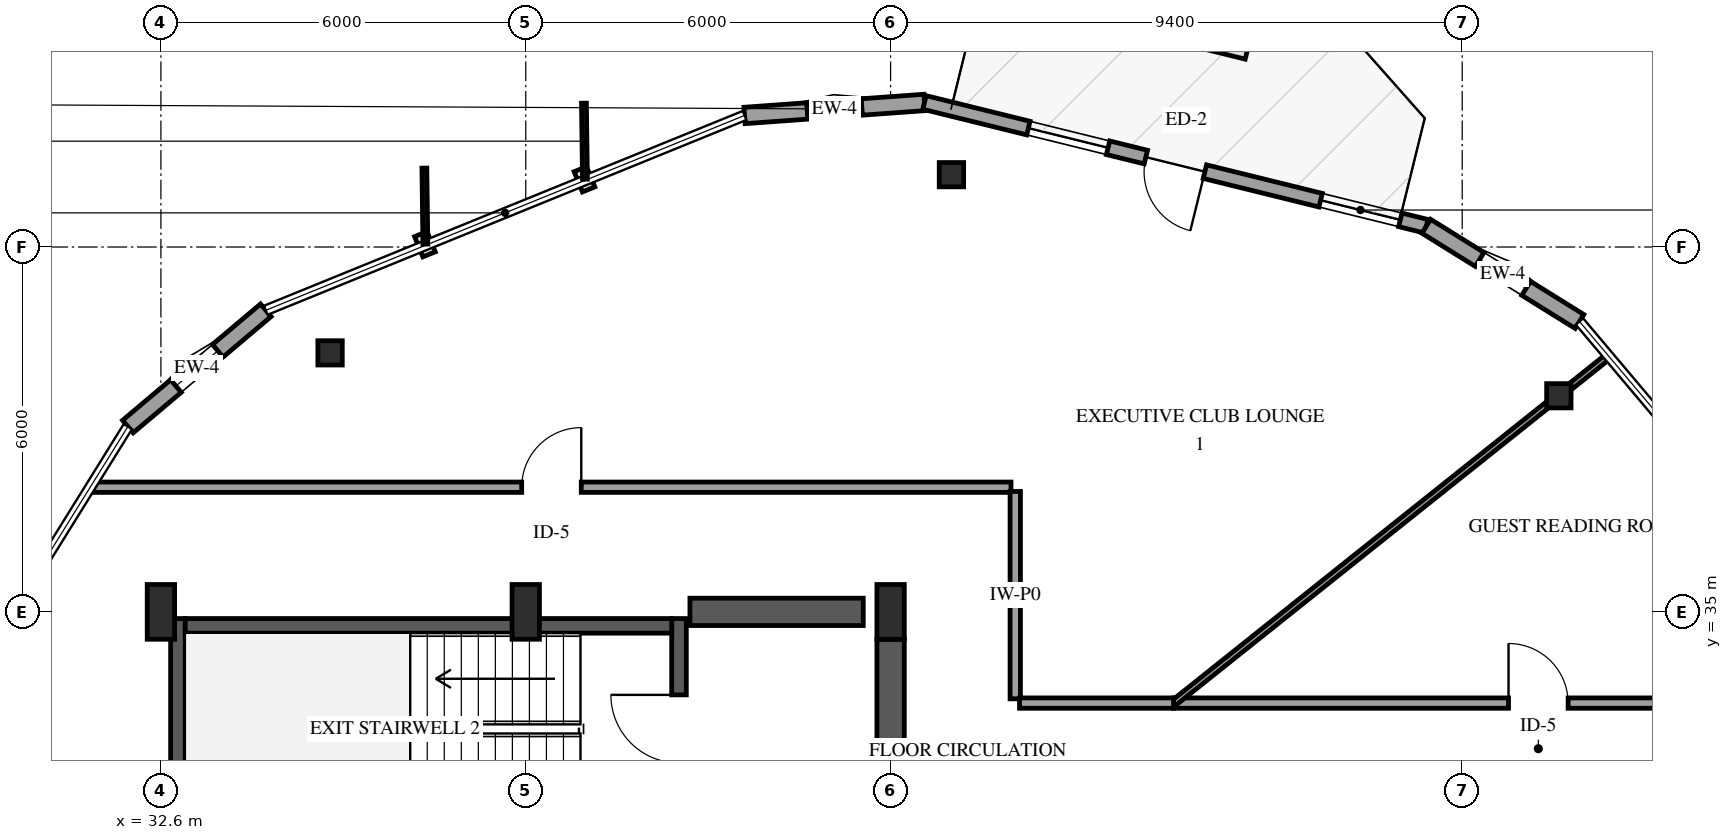
"""IFC4 building model, lengths in metres.
Left out: names, types, materials, properties, quantities, classifications, styles, units other than length and angle.
Written with IfcOpenShell. Run it as: python <this file> out.ifc"""

import sys

from ifc_helpers import new_model, si_unit, direction, frame, frame_2d, origin, origin_2d, place, context, subcontext, project, spatial, rectangle, i_section, extrude, element, fill, save


model = new_model("IFC4")
c1 = context("Model", 3, precision=1e-05, world=origin(), true_north=direction((0.0, 1.0)))
c2 = subcontext(c1, "Body", "Model", "MODEL_VIEW")
j1 = project(units=[si_unit("LENGTHUNIT", "METRE"), si_unit("PLANEANGLEUNIT", "RADIAN")], contexts=[c1])
p1 = place(None, origin())
s1 = spatial("IfcSite", under=j1, at=p1, CompositionType="ELEMENT")
p2 = place(p1, origin())
s2 = spatial("IfcBuilding", under=s1, at=p2, CompositionType="ELEMENT")
p3 = place(p2, frame((0.0, 0.0, 246.25)))
s3 = spatial("IfcBuildingStorey", under=s2, at=p3, CompositionType="ELEMENT", Elevation=246.25)
p4 = place(p3, frame((32.88, 31.26, 0.0), z_axis=(0.0, 0.0, 1.0), x_axis=(0.0, 1.0, 0.0)))
e1 = element("IfcWall", 1, at=p4, inside=s3, PredefinedType="SHEAR", context=c2, shape_type="SweptSolid", body=[
    extrude(rectangle(XDim=3.63, YDim=0.24, at=frame_2d((1.815, 0.0))), origin(), (0.0, 0.0, 1.0), 3.75),
])
p5 = place(p3, frame((41.12, 31.26, 0.0), z_axis=(0.0, 0.0, 1.0), x_axis=(0.0, 1.0, 0.0)))
e2 = element("IfcWall", 2, at=p5, inside=s3, PredefinedType="SHEAR", context=c2, shape_type="SweptSolid", body=[
    extrude(rectangle(XDim=3.63, YDim=0.24, at=frame_2d((1.815, 0.0))), origin(), (0.0, 0.0, 1.0), 3.75),
])
p6 = place(p5, frame((1.255, 0.0, 0.0)))
e3 = element("IfcOpeningElement", 3, at=p6, cuts=e2, PredefinedType="OPENING", context=c2, shape_type="SweptSolid", body=[
    extrude(rectangle(XDim=1.12, YDim=2.15, at=frame_2d((0.56, 1.075))), frame((0.0, 0.13, 0.0), z_axis=(0.0, -1.0, 0.0), x_axis=(1.0, 0.0, 0.0)), (0.0, 0.0, 1.0), 0.26),
])
p7 = place(p3, frame((33.0, 34.77, 0.0), z_axis=(0.0, 0.0, 1.0), x_axis=(1.0, 0.0, 0.0)))
e4 = element("IfcWall", 4, at=p7, inside=s3, PredefinedType="SHEAR", context=c2, shape_type="SweptSolid", body=[
    extrude(rectangle(XDim=8.0, YDim=0.24, at=frame_2d((4.0, 0.0))), origin(), (0.0, 0.0, 1.0), 3.75),
])
p8 = place(p3, frame((41.3, 35.0, 0.0), z_axis=(0.0, 0.0, 1.0), x_axis=(1.0, 0.0, 0.0)))
e5 = element("IfcWall", 5, at=p8, inside=s3, PredefinedType="SHEAR", context=c2, shape_type="SweptSolid", body=[
    extrude(rectangle(XDim=2.85, YDim=0.45, at=frame_2d((1.425, 0.0))), origin(), (0.0, 0.0, 1.0), 3.75),
])
p9 = place(p3, frame((44.6, 29.8, 0.0), z_axis=(0.0, 0.0, 1.0), x_axis=(0.0, 1.0, 0.0)))
e6 = element("IfcWall", 6, at=p9, inside=s3, PredefinedType="SHEAR", context=c2, shape_type="SweptSolid", body=[
    extrude(rectangle(XDim=4.75, YDim=0.45, at=frame_2d((2.375, 0.0))), origin(), (0.0, 0.0, 1.0), 3.75),
])
for number, where, z_axis, x_axis in (
    (7, (32.6, 35.0, 0.0), (0.0, 0.0, 1.0), (1.0, 0.0, 0.0)),
    (8, (38.6, 35.0, 0.0), (0.0, 0.0, 1.0), (1.0, 0.0, 0.0)),
    (9, (44.6, 35.0, 0.0), (0.0, 0.0, 1.0), (1.0, 0.0, 0.0)),
):
    element("IfcColumn", number, at=place(p3, frame(where, z_axis=z_axis, x_axis=x_axis)), inside=s3, PredefinedType="PILASTER", context=c2, shape_type="SweptSolid", body=[
        extrude(rectangle(XDim=0.45, YDim=0.9, at=origin_2d()), origin(), (0.0, 0.0, 1.0), 3.75),
    ])
for number, where, z_axis, x_axis in (
    (10, (55.589, 38.554, 0.0), (0.0, 0.0, 1.0), (1.0, 0.0, 0.0)),
    (11, (45.6, 42.189, 0.0), (0.0, 0.0, 1.0), (1.0, 0.0, 0.0)),
    (12, (35.382, 39.26, 0.0), (0.0, 0.0, 1.0), (1.0, 0.0, 0.0)),
):
    element("IfcColumn", number, at=place(p3, frame(where, z_axis=z_axis, x_axis=x_axis)), inside=s3, PredefinedType="COLUMN", context=c2, shape_type="SweptSolid", body=[
        extrude(i_section(OverallWidth=0.401, OverallDepth=0.399, WebThickness=0.025, FlangeThickness=0.04, FilletRadius=0.038, at=origin_2d()), origin(), (0.0, 0.0, 1.0), 3.75),
    ])
p10 = place(p3, frame((45.157, 43.377, 0.0), z_axis=(0.0, 0.0, 1.0), x_axis=(-0.997392270269, -0.072171041339, 0.0)))
e13 = element("IfcWall", 13, at=p10, inside=s3, PredefinedType="SOLIDWALL", context=c2, shape_type="SweptSolid", body=[
    extrude(rectangle(XDim=2.967, YDim=0.27, at=frame_2d((1.483, 0.0))), origin(), (0.0, 0.0, 1.0), 2.829),
])
p11 = place(p10, frame((1.033, 0.0, 0.75)))
e14 = element("IfcOpeningElement", 14, at=p11, cuts=e13, PredefinedType="OPENING", context=c2, shape_type="SweptSolid", body=[
    extrude(rectangle(XDim=0.9, YDim=1.5, at=frame_2d((0.45, 0.75))), frame((0.0, 0.145, 0.0), z_axis=(0.0, -1.0, 0.0), x_axis=(1.0, 0.0, 0.0)), (0.0, 0.0, 1.0), 0.29),
])
p12 = place(p3, frame((53.409, 41.341, 0.0), z_axis=(0.0, 0.0, 1.0), x_axis=(-0.970889723336, 0.239526919408, 0.0)))
e15 = element("IfcWall", 15, at=p12, inside=s3, PredefinedType="SOLIDWALL", context=c2, shape_type="SweptSolid", body=[
    extrude(rectangle(XDim=8.5, YDim=0.23, at=frame_2d((4.25, 0.0))), origin(), (0.0, 0.0, 1.0), 2.829),
])
p13 = place(p12, frame((3.75, 0.0, 0.0)))
e16 = element("IfcOpeningElement", 16, at=p13, cuts=e15, PredefinedType="OPENING", context=c2, shape_type="SweptSolid", body=[
    extrude(rectangle(XDim=1.0, YDim=2.15, at=frame_2d((0.5, 1.075))), frame((0.0, 0.125, 0.0), z_axis=(0.0, -1.0, 0.0), x_axis=(1.0, 0.0, 0.0)), (0.0, 0.0, 1.0), 0.25),
])
p14 = place(p12, frame((0.44, 0.0, 0.72)))
e17 = element("IfcOpeningElement", 17, at=p14, cuts=e15, PredefinedType="OPENING", context=c2, shape_type="SweptSolid", body=[
    extrude(rectangle(XDim=1.35, YDim=1.65, at=frame_2d((0.675, 0.825))), frame((0.0, 0.125, 0.0), z_axis=(0.0, -1.0, 0.0), x_axis=(1.0, 0.0, 0.0)), (0.0, 0.0, 1.0), 0.25),
])
p15 = place(p12, frame((5.39, 0.0, 0.72)))
e18 = element("IfcOpeningElement", 18, at=p15, cuts=e15, PredefinedType="OPENING", context=c2, shape_type="SweptSolid", body=[
    extrude(rectangle(XDim=1.35, YDim=1.65, at=frame_2d((0.675, 0.825))), frame((0.0, 0.125, 0.0), z_axis=(0.0, -1.0, 0.0), x_axis=(1.0, 0.0, 0.0)), (0.0, 0.0, 1.0), 0.25),
])
p16 = place(p3, frame((34.325, 39.96, 0.0), z_axis=(0.0, 0.0, 1.0), x_axis=(-0.764511985062, -0.644609513347, 0.0)))
e19 = element("IfcWall", 19, at=p16, inside=s3, PredefinedType="SOLIDWALL", context=c2, shape_type="SweptSolid", body=[
    extrude(rectangle(XDim=2.967, YDim=0.27, at=frame_2d((1.483, 0.0))), origin(), (0.0, 0.0, 1.0), 2.829),
])
p17 = place(p16, frame((1.033, 0.0, 0.75)))
e20 = element("IfcOpeningElement", 20, at=p17, cuts=e19, PredefinedType="OPENING", context=c2, shape_type="SweptSolid", body=[
    extrude(rectangle(XDim=0.9, YDim=1.5, at=frame_2d((0.45, 0.75))), frame((0.0, 0.145, 0.0), z_axis=(0.0, -1.0, 0.0), x_axis=(1.0, 0.0, 0.0)), (0.0, 0.0, 1.0), 0.29),
])
p18 = place(p3, frame((55.929, 39.775, 0.0), z_axis=(0.0, 0.0, 1.0), x_axis=(-0.849350139028, 0.527829841268, 0.0)))
e21 = element("IfcWall", 21, at=p18, inside=s3, PredefinedType="SOLIDWALL", context=c2, shape_type="SweptSolid", body=[
    extrude(rectangle(XDim=2.967, YDim=0.27, at=frame_2d((1.483, 0.0))), origin(), (0.0, 0.0, 1.0), 2.829),
])
p19 = place(p18, frame((1.033, 0.0, 0.75)))
e22 = element("IfcOpeningElement", 22, at=p19, cuts=e21, PredefinedType="OPENING", context=c2, shape_type="SweptSolid", body=[
    extrude(rectangle(XDim=0.9, YDim=1.5, at=frame_2d((0.45, 0.75))), frame((0.0, 0.145, 0.0), z_axis=(0.0, -1.0, 0.0), x_axis=(1.0, 0.0, 0.0)), (0.0, 0.0, 1.0), 0.29),
])
p20 = place(p3, frame((31.437, 37.05, 0.0), z_axis=(0.0, 0.0, 1.0), x_axis=(1.0, 0.0, 0.0)))
e23 = element("IfcWall", 23, at=p20, inside=s3, PredefinedType="PARTITIONING", context=c2, shape_type="SweptSolid", body=[
    extrude(rectangle(XDim=15.143, YDim=0.17, at=frame_2d((7.572, 0.0))), origin(), (0.0, 0.0, 1.0), 3.45),
])
p21 = place(p20, frame((7.096, 0.0, 0.0)))
e24 = element("IfcOpeningElement", 24, at=p21, cuts=e23, PredefinedType="OPENING", context=c2, shape_type="SweptSolid", body=[
    extrude(rectangle(XDim=0.98, YDim=2.15, at=frame_2d((0.49, 1.075))), frame((0.0, 0.095, 0.0), z_axis=(0.0, -1.0, 0.0), x_axis=(1.0, 0.0, 0.0)), (0.0, 0.0, 1.0), 0.19),
])
p22 = place(p3, frame((49.254, 33.5, 0.0), z_axis=(0.0, 0.0, 1.0), x_axis=(1.0, 0.0, 0.0)))
e25 = element("IfcWall", 25, at=p22, inside=s3, PredefinedType="PARTITIONING", context=c2, shape_type="SweptSolid", body=[
    extrude(rectangle(XDim=11.967, YDim=0.17, at=frame_2d((5.983, 0.0))), origin(), (0.0, 0.0, 1.0), 3.45),
])
p23 = place(p22, frame((5.508, 0.0, 0.0)))
e26 = element("IfcOpeningElement", 26, at=p23, cuts=e25, PredefinedType="OPENING", context=c2, shape_type="SweptSolid", body=[
    extrude(rectangle(XDim=0.98, YDim=2.15, at=frame_2d((0.49, 1.075))), frame((0.0, 0.095, 0.0), z_axis=(0.0, -1.0, 0.0), x_axis=(1.0, 0.0, 0.0)), (0.0, 0.0, 1.0), 0.19),
])
p24 = place(p3, frame((49.254, 33.5, 0.0), z_axis=(0.0, 0.0, 1.0), x_axis=(0.781732154671, 0.623614334628, 0.0)))
e27 = element("IfcWall", 27, at=p24, inside=s3, PredefinedType="PARTITIONING", context=c2, shape_type="SweptSolid", body=[
    extrude(rectangle(XDim=9.152, YDim=0.1, at=frame_2d((4.576, 0.0))), origin(), (0.0, 0.0, 1.0), 3.45),
])
p25 = place(p3, frame((46.65, 36.98, 0.0), z_axis=(0.0, 0.0, 1.0), x_axis=(0.0, -1.0, 0.0)))
e28 = element("IfcWall", 28, at=p25, inside=s3, PredefinedType="PARTITIONING", context=c2, shape_type="SweptSolid", body=[
    extrude(rectangle(XDim=3.41, YDim=0.17, at=frame_2d((1.705, 0.0))), origin(), (0.0, 0.0, 1.0), 3.45),
])
p26 = place(p3, frame((46.72, 33.5, 0.0), z_axis=(0.0, 0.0, 1.0), x_axis=(1.0, 0.0, 0.0)))
e29 = element("IfcWall", 29, at=p26, inside=s3, PredefinedType="PARTITIONING", context=c2, shape_type="SweptSolid", body=[
    extrude(rectangle(XDim=2.534, YDim=0.17, at=frame_2d((1.267, 0.0))), origin(), (0.0, 0.0, 1.0), 3.45),
])
p27 = place(p11, origin())
e30 = element("IfcWindow", 30, at=p27, inside=s3, PartitioningType="SINGLE_PANEL", PredefinedType="WINDOW", context=c2, shape_type="SweptSolid", body=[
    extrude(rectangle(XDim=0.9, YDim=1.5, at=frame_2d((0.45, 0.75))), frame((0.0, 0.03, 0.0), z_axis=(0.0, -1.0, 0.0), x_axis=(1.0, 0.0, 0.0)), (0.0, 0.0, 1.0), 0.06),
])
fill(e14, e30)
p28 = place(p13, origin())
e31 = element("IfcDoor", 31, at=p28, inside=s3, OperationType="SINGLE_SWING_LEFT", PredefinedType="DOOR", context=c2, shape_type="SweptSolid", body=[
    extrude(rectangle(XDim=1.0, YDim=2.15, at=frame_2d((0.5, 1.075))), frame((0.0, 0.025, 0.0), z_axis=(0.0, -1.0, 0.0), x_axis=(1.0, 0.0, 0.0)), (0.0, 0.0, 1.0), 0.05),
])
fill(e16, e31)
p29 = place(p14, origin())
e32 = element("IfcWindow", 32, at=p29, inside=s3, PartitioningType="SINGLE_PANEL", PredefinedType="WINDOW", context=c2, shape_type="SweptSolid", body=[
    extrude(rectangle(XDim=1.35, YDim=1.65, at=frame_2d((0.675, 0.825))), frame((0.0, 0.03, 0.0), z_axis=(0.0, -1.0, 0.0), x_axis=(1.0, 0.0, 0.0)), (0.0, 0.0, 1.0), 0.06),
])
fill(e17, e32)
p30 = place(p15, origin())
e33 = element("IfcWindow", 33, at=p30, inside=s3, PartitioningType="SINGLE_PANEL", PredefinedType="WINDOW", context=c2, shape_type="SweptSolid", body=[
    extrude(rectangle(XDim=1.35, YDim=1.65, at=frame_2d((0.675, 0.825))), frame((0.0, 0.03, 0.0), z_axis=(0.0, -1.0, 0.0), x_axis=(1.0, 0.0, 0.0)), (0.0, 0.0, 1.0), 0.06),
])
fill(e18, e33)
p31 = place(p17, origin())
e34 = element("IfcWindow", 34, at=p31, inside=s3, PartitioningType="SINGLE_PANEL", PredefinedType="WINDOW", context=c2, shape_type="SweptSolid", body=[
    extrude(rectangle(XDim=0.9, YDim=1.5, at=frame_2d((0.45, 0.75))), frame((0.0, 0.03, 0.0), z_axis=(0.0, -1.0, 0.0), x_axis=(1.0, 0.0, 0.0)), (0.0, 0.0, 1.0), 0.06),
])
fill(e20, e34)
p32 = place(p19, origin())
e35 = element("IfcWindow", 35, at=p32, inside=s3, PartitioningType="SINGLE_PANEL", PredefinedType="WINDOW", context=c2, shape_type="SweptSolid", body=[
    extrude(rectangle(XDim=0.9, YDim=1.5, at=frame_2d((0.45, 0.75))), frame((0.0, 0.03, 0.0), z_axis=(0.0, -1.0, 0.0), x_axis=(1.0, 0.0, 0.0)), (0.0, 0.0, 1.0), 0.06),
])
fill(e22, e35)
p33 = place(p6, origin())
e36 = element("IfcDoor", 36, at=p33, inside=s3, OperationType="SINGLE_SWING_RIGHT", PredefinedType="DOOR", context=c2, shape_type="SweptSolid", body=[
    extrude(rectangle(XDim=1.12, YDim=2.15, at=frame_2d((0.56, 1.075))), frame((0.0, 0.025, 0.0), z_axis=(0.0, -1.0, 0.0), x_axis=(1.0, 0.0, 0.0)), (0.0, 0.0, 1.0), 0.05),
])
fill(e3, e36)
p34 = place(p21, origin())
e37 = element("IfcDoor", 37, at=p34, inside=s3, OperationType="SINGLE_SWING_RIGHT", PredefinedType="DOOR", context=c2, shape_type="SweptSolid", body=[
    extrude(rectangle(XDim=0.98, YDim=2.15, at=frame_2d((0.49, 1.075))), frame((0.0, 0.025, 0.0), z_axis=(0.0, -1.0, 0.0), x_axis=(1.0, 0.0, 0.0)), (0.0, 0.0, 1.0), 0.05),
])
fill(e24, e37)
p35 = place(p23, origin())
e38 = element("IfcDoor", 38, at=p35, inside=s3, OperationType="SINGLE_SWING_LEFT", PredefinedType="DOOR", context=c2, shape_type="SweptSolid", body=[
    extrude(rectangle(XDim=0.98, YDim=2.15, at=frame_2d((0.49, 1.075))), frame((0.0, 0.025, 0.0), z_axis=(0.0, -1.0, 0.0), x_axis=(1.0, 0.0, 0.0)), (0.0, 0.0, 1.0), 0.05),
])
fill(e26, e38)
save(model, sys.argv[1])
